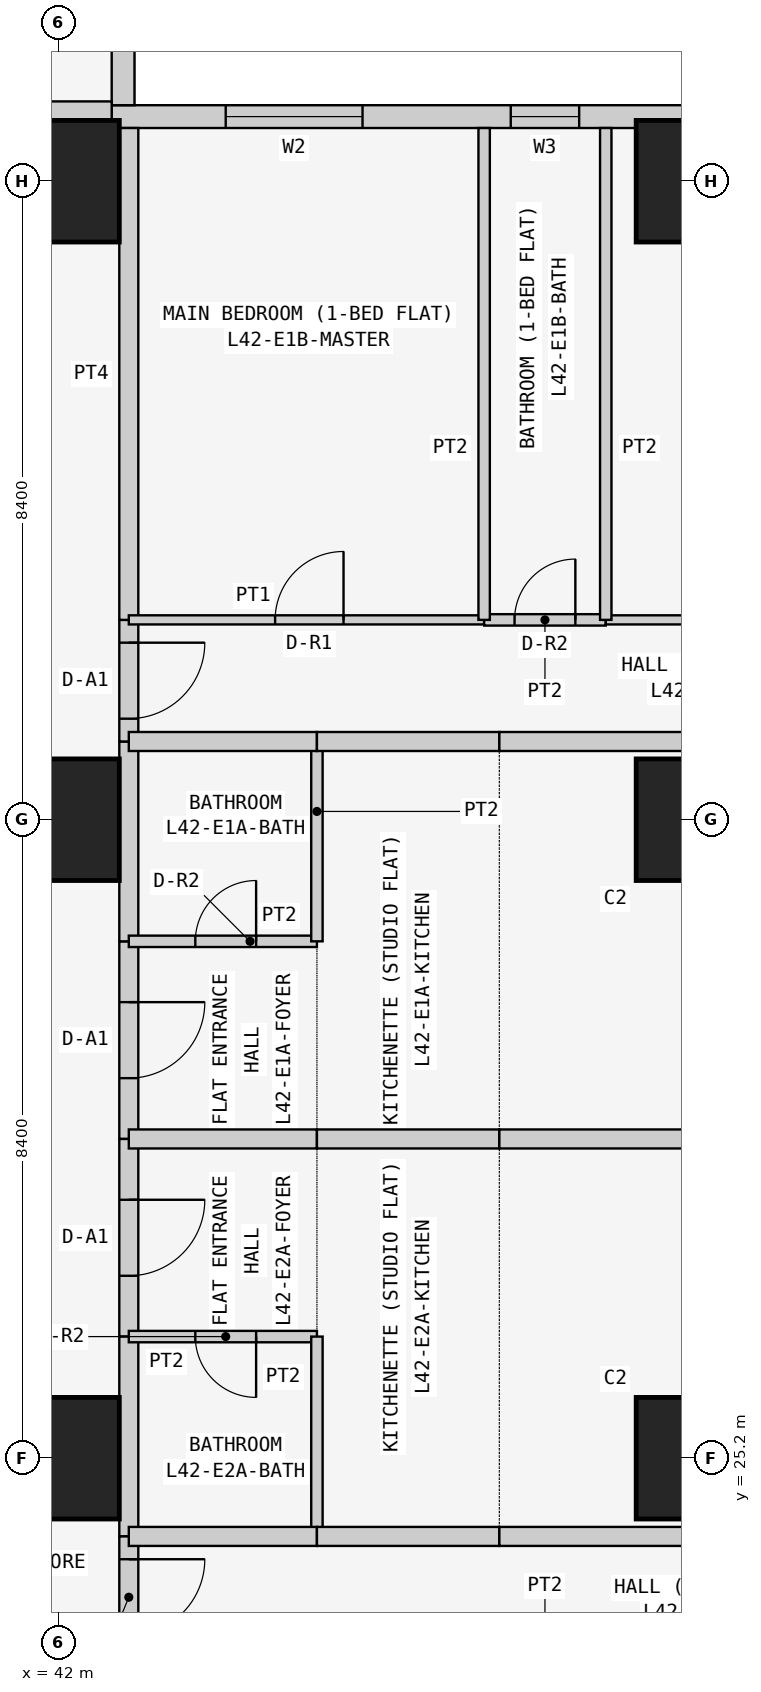
"""IFC4 building model, lengths in metres.
Left out: names, types, materials, properties, quantities, classifications, styles, units other than length and angle.
Written with IfcOpenShell. Run it as: python <this file> out.ifc"""

import sys

from ifc_helpers import new_model, si_unit, direction, frame, frame_2d, origin, origin_2d, place, context, subcontext, project, spatial, rectangle, extrude, element, fill, save


model = new_model("IFC4")
c1 = context("Model", 3, precision=1e-05, world=origin(), true_north=direction((0.0, 1.0)))
c2 = subcontext(c1, "Body", "Model", "MODEL_VIEW")
j1 = project(units=[si_unit("LENGTHUNIT", "METRE"), si_unit("PLANEANGLEUNIT", "RADIAN")], contexts=[c1])
p1 = place(None, origin())
s1 = spatial("IfcSite", under=j1, at=p1, CompositionType="ELEMENT")
p2 = place(p1, origin())
s2 = spatial("IfcBuilding", under=s1, at=p2, CompositionType="ELEMENT")
p3 = place(p2, frame((0.0, 0.0, 162.9)))
s3 = spatial("IfcBuildingStorey", under=s2, at=p3, CompositionType="ELEMENT", Elevation=162.9)
for number, where, z_axis, x_axis in (
    (1, (42.0, 25.2, 0.0), (0.0, 0.0, 1.0), (1.0, 0.0, 0.0)),
    (2, (42.0, 33.6, 0.0), (0.0, 0.0, 1.0), (1.0, 0.0, 0.0)),
    (3, (42.0, 42.0, 0.0), (0.0, 0.0, 1.0), (1.0, 0.0, 0.0)),
    (4, (50.4, 25.2, 0.0), (0.0, 0.0, 1.0), (1.0, 0.0, 0.0)),
    (5, (50.4, 33.6, 0.0), (0.0, 0.0, 1.0), (1.0, 0.0, 0.0)),
    (6, (50.4, 42.0, 0.0), (0.0, 0.0, 1.0), (1.0, 0.0, 0.0)),
):
    element("IfcColumn", number, at=place(p3, frame(where, z_axis=z_axis, x_axis=x_axis)), inside=s3, PredefinedType="COLUMN", context=c2, shape_type="SweptSolid", body=[
        extrude(rectangle(XDim=1.6, YDim=1.6, at=origin_2d()), origin(), (0.0, 0.0, 1.0), 3.6),
    ])
p4 = place(p3, frame((58.4, 42.85, 0.0), z_axis=(0.0, 0.0, 1.0), x_axis=(-1.0, 0.0, 0.0)))
e7 = element("IfcWall", 7, at=p4, inside=s3, PredefinedType="SOLIDWALL", context=c2, shape_type="SweptSolid", body=[
    extrude(rectangle(XDim=15.7, YDim=0.3, at=frame_2d((7.85, 0.0))), origin(), (0.0, 0.0, 1.0), 3.45),
])
p5 = place(p4, frame((12.4, 0.0, 0.9)))
e8 = element("IfcOpeningElement", 8, at=p5, cuts=e7, PredefinedType="OPENING", context=c2, shape_type="SweptSolid", body=[
    extrude(rectangle(XDim=1.8, YDim=1.5, at=frame_2d((0.9, 0.75))), frame((0.0, 0.16, 0.0), z_axis=(0.0, -1.0, 0.0), x_axis=(1.0, 0.0, 0.0)), (0.0, 0.0, 1.0), 0.32),
])
p6 = place(p4, frame((9.55, 0.0, 1.5)))
e9 = element("IfcOpeningElement", 9, at=p6, cuts=e7, PredefinedType="OPENING", context=c2, shape_type="SweptSolid", body=[
    extrude(rectangle(XDim=0.9, YDim=0.7, at=frame_2d((0.45, 0.35))), frame((0.0, 0.16, 0.0), z_axis=(0.0, -1.0, 0.0), x_axis=(1.0, 0.0, 0.0)), (0.0, 0.0, 1.0), 0.32),
])
p7 = place(p4, frame((5.1, 0.0, 0.9)))
e10 = element("IfcOpeningElement", 10, at=p7, cuts=e7, PredefinedType="OPENING", context=c2, shape_type="SweptSolid", body=[
    extrude(rectangle(XDim=1.8, YDim=1.5, at=frame_2d((0.9, 0.75))), frame((0.0, 0.16, 0.0), z_axis=(0.0, -1.0, 0.0), x_axis=(1.0, 0.0, 0.0)), (0.0, 0.0, 1.0), 0.32),
])
p8 = place(p4, frame((2.0, 0.0, 0.0)))
e11 = element("IfcOpeningElement", 11, at=p8, cuts=e7, PredefinedType="OPENING", context=c2, shape_type="SweptSolid", body=[
    extrude(rectangle(XDim=0.9, YDim=2.4, at=frame_2d((0.45, 1.2))), frame((0.0, 0.16, 0.0), z_axis=(0.0, -1.0, 0.0), x_axis=(1.0, 0.0, 0.0)), (0.0, 0.0, 1.0), 0.32),
])
p9 = place(p4, frame((0.7, 0.0, 0.9)))
e12 = element("IfcOpeningElement", 12, at=p9, cuts=e7, PredefinedType="OPENING", context=c2, shape_type="SweptSolid", body=[
    extrude(rectangle(XDim=1.2, YDim=1.5, at=frame_2d((0.6, 0.75))), frame((0.0, 0.16, 0.0), z_axis=(0.0, -1.0, 0.0), x_axis=(1.0, 0.0, 0.0)), (0.0, 0.0, 1.0), 0.32),
])
p10 = place(p3, frame((42.85, 43.0, 0.0), z_axis=(0.0, 0.0, 1.0), x_axis=(0.0, 1.0, 0.0)))
e13 = element("IfcWall", 13, at=p10, inside=s3, PredefinedType="SOLIDWALL", context=c2, shape_type="SweptSolid", body=[
    extrude(rectangle(XDim=7.0, YDim=0.3, at=frame_2d((3.5, 0.0))), origin(), (0.0, 0.0, 1.0), 3.45),
])
p11 = place(p10, frame((1.5, 0.0, 0.9)))
e14 = element("IfcOpeningElement", 14, at=p11, cuts=e13, PredefinedType="OPENING", context=c2, shape_type="SweptSolid", body=[
    extrude(rectangle(XDim=2.4, YDim=1.5, at=frame_2d((1.2, 0.75))), frame((0.0, 0.16, 0.0), z_axis=(0.0, -1.0, 0.0), x_axis=(1.0, 0.0, 0.0)), (0.0, 0.0, 1.0), 0.32),
])
p12 = place(p10, frame((5.05, 0.0, 0.9)))
e15 = element("IfcOpeningElement", 15, at=p12, cuts=e13, PredefinedType="OPENING", context=c2, shape_type="SweptSolid", body=[
    extrude(rectangle(XDim=1.2, YDim=1.5, at=frame_2d((0.6, 0.75))), frame((0.0, 0.16, 0.0), z_axis=(0.0, -1.0, 0.0), x_axis=(1.0, 0.0, 0.0)), (0.0, 0.0, 1.0), 0.32),
])
p13 = place(p3, frame((35.829, 42.925, 0.0), z_axis=(0.0, 0.0, 1.0), x_axis=(1.0, 0.0, 0.0)))
e16 = element("IfcWall", 16, at=p13, inside=s3, PredefinedType="PARTITIONING", context=c2, shape_type="SweptSolid", body=[
    extrude(rectangle(XDim=6.871, YDim=0.25, at=frame_2d((3.436, 0.0))), origin(), (0.0, 0.0, 1.0), 3.45),
])
p14 = place(p3, frame((42.925, 32.0, 0.0), z_axis=(0.0, 0.0, 1.0), x_axis=(0.0, -1.0, 0.0)))
e17 = element("IfcWall", 17, at=p14, inside=s3, PredefinedType="PARTITIONING", context=c2, shape_type="SweptSolid", body=[
    extrude(rectangle(XDim=2.6, YDim=0.25, at=frame_2d((1.3, 0.0))), origin(), (0.0, 0.0, 1.0), 3.45),
])
p15 = place(p14, frame((0.8, 0.0, 0.0)))
e18 = element("IfcOpeningElement", 18, at=p15, cuts=e17, PredefinedType="OPENING", context=c2, shape_type="SweptSolid", body=[
    extrude(rectangle(XDim=1.0, YDim=2.1, at=frame_2d((0.5, 1.05))), frame((0.0, 0.135, 0.0), z_axis=(0.0, -1.0, 0.0), x_axis=(1.0, 0.0, 0.0)), (0.0, 0.0, 1.0), 0.27),
])
p16 = place(p3, frame((42.925, 34.629, 0.0), z_axis=(0.0, 0.0, 1.0), x_axis=(0.0, -1.0, 0.0)))
e19 = element("IfcWall", 19, at=p16, inside=s3, PredefinedType="PARTITIONING", context=c2, shape_type="SweptSolid", body=[
    extrude(rectangle(XDim=2.629, YDim=0.25, at=frame_2d((1.314, 0.0))), origin(), (0.0, 0.0, 1.0), 3.45),
])
p17 = place(p3, frame((42.925, 36.229, 0.0), z_axis=(0.0, 0.0, 1.0), x_axis=(0.0, -1.0, 0.0)))
e20 = element("IfcWall", 20, at=p17, inside=s3, PredefinedType="PARTITIONING", context=c2, shape_type="SweptSolid", body=[
    extrude(rectangle(XDim=1.6, YDim=0.25, at=frame_2d((0.8, 0.0))), origin(), (0.0, 0.0, 1.0), 3.45),
])
p18 = place(p17, frame((0.3, 0.0, 0.0)))
e21 = element("IfcOpeningElement", 21, at=p18, cuts=e20, PredefinedType="OPENING", context=c2, shape_type="SweptSolid", body=[
    extrude(rectangle(XDim=1.0, YDim=2.1, at=frame_2d((0.5, 1.05))), frame((0.0, 0.135, 0.0), z_axis=(0.0, -1.0, 0.0), x_axis=(1.0, 0.0, 0.0)), (0.0, 0.0, 1.0), 0.27),
])
p19 = place(p3, frame((42.925, 42.7, 0.0), z_axis=(0.0, 0.0, 1.0), x_axis=(0.0, -1.0, 0.0)))
e22 = element("IfcWall", 22, at=p19, inside=s3, PredefinedType="PARTITIONING", context=c2, shape_type="SweptSolid", body=[
    extrude(rectangle(XDim=6.471, YDim=0.25, at=frame_2d((3.235, 0.0))), origin(), (0.0, 0.0, 1.0), 3.45),
])
p20 = place(p3, frame((42.925, 29.4, 0.0), z_axis=(0.0, 0.0, 1.0), x_axis=(0.0, -1.0, 0.0)))
e23 = element("IfcWall", 23, at=p20, inside=s3, PredefinedType="PARTITIONING", context=c2, shape_type="SweptSolid", body=[
    extrude(rectangle(XDim=2.6, YDim=0.25, at=frame_2d((1.3, 0.0))), origin(), (0.0, 0.0, 1.0), 3.45),
])
p21 = place(p20, frame((0.8, 0.0, 0.0)))
e24 = element("IfcOpeningElement", 24, at=p21, cuts=e23, PredefinedType="OPENING", context=c2, shape_type="SweptSolid", body=[
    extrude(rectangle(XDim=1.0, YDim=2.1, at=frame_2d((0.5, 1.05))), frame((0.0, 0.135, 0.0), z_axis=(0.0, -1.0, 0.0), x_axis=(1.0, 0.0, 0.0)), (0.0, 0.0, 1.0), 0.27),
])
p22 = place(p3, frame((42.925, 26.8, 0.0), z_axis=(0.0, 0.0, 1.0), x_axis=(0.0, -1.0, 0.0)))
e25 = element("IfcWall", 25, at=p22, inside=s3, PredefinedType="PARTITIONING", context=c2, shape_type="SweptSolid", body=[
    extrude(rectangle(XDim=2.629, YDim=0.25, at=frame_2d((1.314, 0.0))), origin(), (0.0, 0.0, 1.0), 3.45),
])
p23 = place(p3, frame((42.925, 24.171, 0.0), z_axis=(0.0, 0.0, 1.0), x_axis=(0.0, -1.0, 0.0)))
e26 = element("IfcWall", 26, at=p23, inside=s3, PredefinedType="PARTITIONING", context=c2, shape_type="SweptSolid", body=[
    extrude(rectangle(XDim=1.6, YDim=0.25, at=frame_2d((0.8, 0.0))), origin(), (0.0, 0.0, 1.0), 3.45),
])
p24 = place(p23, frame((0.3, 0.0, 0.0)))
e27 = element("IfcOpeningElement", 27, at=p24, cuts=e26, PredefinedType="OPENING", context=c2, shape_type="SweptSolid", body=[
    extrude(rectangle(XDim=1.0, YDim=2.1, at=frame_2d((0.5, 1.05))), frame((0.0, 0.135, 0.0), z_axis=(0.0, -1.0, 0.0), x_axis=(1.0, 0.0, 0.0)), (0.0, 0.0, 1.0), 0.27),
])
p25 = place(p3, frame((45.4, 32.0, 0.0), z_axis=(0.0, 0.0, 1.0), x_axis=(-1.0, 0.0, 0.0)))
e28 = element("IfcWall", 28, at=p25, inside=s3, PredefinedType="PARTITIONING", context=c2, shape_type="SweptSolid", body=[
    extrude(rectangle(XDim=2.475, YDim=0.15, at=frame_2d((1.237, 0.0))), origin(), (0.0, 0.0, 1.0), 3.45),
])
p26 = place(p25, frame((0.8, 0.0, 0.0)))
e29 = element("IfcOpeningElement", 29, at=p26, cuts=e28, PredefinedType="OPENING", context=c2, shape_type="SweptSolid", body=[
    extrude(rectangle(XDim=0.8, YDim=2.1, at=frame_2d((0.4, 1.05))), frame((0.0, 0.085, 0.0), z_axis=(0.0, -1.0, 0.0), x_axis=(1.0, 0.0, 0.0)), (0.0, 0.0, 1.0), 0.17),
])
p27 = place(p3, frame((42.925, 29.4, 0.0), z_axis=(0.0, 0.0, 1.0), x_axis=(1.0, 0.0, 0.0)))
e30 = element("IfcWall", 30, at=p27, inside=s3, PredefinedType="PARTITIONING", context=c2, shape_type="SweptSolid", body=[
    extrude(rectangle(XDim=2.475, YDim=0.25, at=frame_2d((1.237, 0.0))), origin(), (0.0, 0.0, 1.0), 3.45),
])
p28 = place(p3, frame((45.4, 32.0, 0.0), z_axis=(0.0, 0.0, 1.0), x_axis=(0.0, 1.0, 0.0)))
e31 = element("IfcWall", 31, at=p28, inside=s3, PredefinedType="PARTITIONING", context=c2, shape_type="SweptSolid", body=[
    extrude(rectangle(XDim=2.629, YDim=0.15, at=frame_2d((1.314, 0.0))), origin(), (0.0, 0.0, 1.0), 3.45),
])
p29 = place(p3, frame((45.4, 34.629, 0.0), z_axis=(0.0, 0.0, 1.0), x_axis=(-1.0, 0.0, 0.0)))
e32 = element("IfcWall", 32, at=p29, inside=s3, PredefinedType="PARTITIONING", context=c2, shape_type="SweptSolid", body=[
    extrude(rectangle(XDim=2.475, YDim=0.25, at=frame_2d((1.237, 0.0))), origin(), (0.0, 0.0, 1.0), 3.45),
])
for number, where, z_axis, x_axis in (
    (33, (47.8, 34.629, 0.0), (0.0, 0.0, 1.0), (-1.0, 0.0, 0.0)),
    (34, (45.4, 29.4, 0.0), (0.0, 0.0, 1.0), (1.0, 0.0, 0.0)),
):
    element("IfcWall", number, at=place(p3, frame(where, z_axis=z_axis, x_axis=x_axis)), inside=s3, PredefinedType="PARTITIONING", context=c2, shape_type="SweptSolid", body=[
        extrude(rectangle(XDim=2.4, YDim=0.25, at=frame_2d((1.2, 0.0))), origin(), (0.0, 0.0, 1.0), 3.45),
    ])
p30 = place(p3, frame((55.3, 34.629, 0.0), z_axis=(0.0, 0.0, 1.0), x_axis=(-1.0, 0.0, 0.0)))
e35 = element("IfcWall", 35, at=p30, inside=s3, PredefinedType="PARTITIONING", context=c2, shape_type="SweptSolid", body=[
    extrude(rectangle(XDim=7.5, YDim=0.25, at=frame_2d((3.75, 0.0))), origin(), (0.0, 0.0, 1.0), 3.45),
])
p31 = place(p3, frame((47.8, 29.4, 0.0), z_axis=(0.0, 0.0, 1.0), x_axis=(1.0, 0.0, 0.0)))
e36 = element("IfcWall", 36, at=p31, inside=s3, PredefinedType="PARTITIONING", context=c2, shape_type="SweptSolid", body=[
    extrude(rectangle(XDim=11.65, YDim=0.25, at=frame_2d((5.825, 0.0))), origin(), (0.0, 0.0, 1.0), 3.45),
])
p32 = place(p3, frame((47.6, 36.229, 0.0), z_axis=(0.0, 0.0, 1.0), x_axis=(-1.0, 0.0, 0.0)))
e37 = element("IfcWall", 37, at=p32, inside=s3, PredefinedType="PARTITIONING", context=c2, shape_type="SweptSolid", body=[
    extrude(rectangle(XDim=4.675, YDim=0.12, at=frame_2d((2.337, 0.0))), origin(), (0.0, 0.0, 1.0), 3.45),
])
p33 = place(p32, frame((1.85, 0.0, 0.0)))
e38 = element("IfcOpeningElement", 38, at=p33, cuts=e37, PredefinedType="OPENING", context=c2, shape_type="SweptSolid", body=[
    extrude(rectangle(XDim=0.9, YDim=2.1, at=frame_2d((0.45, 1.05))), frame((0.0, 0.07, 0.0), z_axis=(0.0, -1.0, 0.0), x_axis=(1.0, 0.0, 0.0)), (0.0, 0.0, 1.0), 0.14),
])
p34 = place(p3, frame((49.2, 36.229, 0.0), z_axis=(0.0, 0.0, 1.0), x_axis=(-1.0, 0.0, 0.0)))
e39 = element("IfcWall", 39, at=p34, inside=s3, PredefinedType="PARTITIONING", context=c2, shape_type="SweptSolid", body=[
    extrude(rectangle(XDim=1.6, YDim=0.15, at=frame_2d((0.8, 0.0))), origin(), (0.0, 0.0, 1.0), 3.45),
])
p35 = place(p34, frame((0.4, 0.0, 0.0)))
e40 = element("IfcOpeningElement", 40, at=p35, cuts=e39, PredefinedType="OPENING", context=c2, shape_type="SweptSolid", body=[
    extrude(rectangle(XDim=0.8, YDim=2.1, at=frame_2d((0.4, 1.05))), frame((0.0, 0.085, 0.0), z_axis=(0.0, -1.0, 0.0), x_axis=(1.0, 0.0, 0.0)), (0.0, 0.0, 1.0), 0.17),
])
p36 = place(p3, frame((53.6, 36.229, 0.0), z_axis=(0.0, 0.0, 1.0), x_axis=(-1.0, 0.0, 0.0)))
e41 = element("IfcWall", 41, at=p36, inside=s3, PredefinedType="PARTITIONING", context=c2, shape_type="SweptSolid", body=[
    extrude(rectangle(XDim=4.4, YDim=0.12, at=frame_2d((2.2, 0.0))), origin(), (0.0, 0.0, 1.0), 3.45),
])
p37 = place(p36, frame((1.55, 0.0, 0.0)))
e42 = element("IfcOpeningElement", 42, at=p37, cuts=e41, PredefinedType="OPENING", context=c2, shape_type="SweptSolid", body=[
    extrude(rectangle(XDim=0.9, YDim=2.1, at=frame_2d((0.45, 1.05))), frame((0.0, 0.07, 0.0), z_axis=(0.0, -1.0, 0.0), x_axis=(1.0, 0.0, 0.0)), (0.0, 0.0, 1.0), 0.14),
])
for number, where, z_axis, x_axis in (
    (43, (47.6, 36.229, 0.0), (0.0, 0.0, 1.0), (0.0, 1.0, 0.0)),
    (44, (49.2, 36.229, 0.0), (0.0, 0.0, 1.0), (0.0, 1.0, 0.0)),
):
    element("IfcWall", number, at=place(p3, frame(where, z_axis=z_axis, x_axis=x_axis)), inside=s3, PredefinedType="PARTITIONING", context=c2, shape_type="SweptSolid", body=[
        extrude(rectangle(XDim=6.471, YDim=0.15, at=frame_2d((3.235, 0.0))), origin(), (0.0, 0.0, 1.0), 3.45),
    ])
p38 = place(p3, frame((45.4, 26.8, 0.0), z_axis=(0.0, 0.0, 1.0), x_axis=(-1.0, 0.0, 0.0)))
e45 = element("IfcWall", 45, at=p38, inside=s3, PredefinedType="PARTITIONING", context=c2, shape_type="SweptSolid", body=[
    extrude(rectangle(XDim=2.475, YDim=0.15, at=frame_2d((1.237, 0.0))), origin(), (0.0, 0.0, 1.0), 3.45),
])
p39 = place(p38, frame((0.8, 0.0, 0.0)))
e46 = element("IfcOpeningElement", 46, at=p39, cuts=e45, PredefinedType="OPENING", context=c2, shape_type="SweptSolid", body=[
    extrude(rectangle(XDim=0.8, YDim=2.1, at=frame_2d((0.4, 1.05))), frame((0.0, 0.085, 0.0), z_axis=(0.0, -1.0, 0.0), x_axis=(1.0, 0.0, 0.0)), (0.0, 0.0, 1.0), 0.17),
])
p40 = place(p3, frame((45.4, 26.8, 0.0), z_axis=(0.0, 0.0, 1.0), x_axis=(0.0, -1.0, 0.0)))
e47 = element("IfcWall", 47, at=p40, inside=s3, PredefinedType="PARTITIONING", context=c2, shape_type="SweptSolid", body=[
    extrude(rectangle(XDim=2.629, YDim=0.15, at=frame_2d((1.314, 0.0))), origin(), (0.0, 0.0, 1.0), 3.45),
])
p41 = place(p3, frame((45.4, 24.171, 0.0), z_axis=(0.0, 0.0, 1.0), x_axis=(-1.0, 0.0, 0.0)))
e48 = element("IfcWall", 48, at=p41, inside=s3, PredefinedType="PARTITIONING", context=c2, shape_type="SweptSolid", body=[
    extrude(rectangle(XDim=2.475, YDim=0.25, at=frame_2d((1.237, 0.0))), origin(), (0.0, 0.0, 1.0), 3.45),
])
p42 = place(p3, frame((47.8, 24.171, 0.0), z_axis=(0.0, 0.0, 1.0), x_axis=(-1.0, 0.0, 0.0)))
e49 = element("IfcWall", 49, at=p42, inside=s3, PredefinedType="PARTITIONING", context=c2, shape_type="SweptSolid", body=[
    extrude(rectangle(XDim=2.4, YDim=0.25, at=frame_2d((1.2, 0.0))), origin(), (0.0, 0.0, 1.0), 3.45),
])
p43 = place(p3, frame((55.3, 24.171, 0.0), z_axis=(0.0, 0.0, 1.0), x_axis=(-1.0, 0.0, 0.0)))
e50 = element("IfcWall", 50, at=p43, inside=s3, PredefinedType="PARTITIONING", context=c2, shape_type="SweptSolid", body=[
    extrude(rectangle(XDim=7.5, YDim=0.25, at=frame_2d((3.75, 0.0))), origin(), (0.0, 0.0, 1.0), 3.45),
])
p44 = place(p5, origin())
e51 = element("IfcWindow", 51, at=p44, inside=s3, PartitioningType="SINGLE_PANEL", PredefinedType="WINDOW", context=c2, shape_type="SweptSolid", body=[
    extrude(rectangle(XDim=1.8, YDim=1.5, at=frame_2d((0.9, 0.75))), frame((0.0, 0.03, 0.0), z_axis=(0.0, -1.0, 0.0), x_axis=(1.0, 0.0, 0.0)), (0.0, 0.0, 1.0), 0.06),
])
fill(e8, e51)
p45 = place(p6, origin())
e52 = element("IfcWindow", 52, at=p45, inside=s3, PartitioningType="SINGLE_PANEL", PredefinedType="WINDOW", context=c2, shape_type="SweptSolid", body=[
    extrude(rectangle(XDim=0.9, YDim=0.7, at=frame_2d((0.45, 0.35))), frame((0.0, 0.03, 0.0), z_axis=(0.0, -1.0, 0.0), x_axis=(1.0, 0.0, 0.0)), (0.0, 0.0, 1.0), 0.06),
])
fill(e9, e52)
p46 = place(p15, origin())
e53 = element("IfcDoor", 53, at=p46, inside=s3, OperationType="SINGLE_SWING_LEFT", PredefinedType="DOOR", context=c2, shape_type="SweptSolid", body=[
    extrude(rectangle(XDim=1.0, YDim=2.1, at=frame_2d((0.5, 1.05))), frame((0.0, 0.025, 0.0), z_axis=(0.0, -1.0, 0.0), x_axis=(1.0, 0.0, 0.0)), (0.0, 0.0, 1.0), 0.05),
])
fill(e18, e53)
p47 = place(p26, frame((0.8, 0.0, 0.0), z_axis=(0.0, 0.0, 1.0), x_axis=(-1.0, 0.0, 0.0)))
e54 = element("IfcDoor", 54, at=p47, inside=s3, OperationType="SINGLE_SWING_RIGHT", PredefinedType="DOOR", context=c2, shape_type="SweptSolid", body=[
    extrude(rectangle(XDim=0.8, YDim=2.1, at=frame_2d((0.4, 1.05))), frame((0.0, 0.025, 0.0), z_axis=(0.0, -1.0, 0.0), x_axis=(1.0, 0.0, 0.0)), (0.0, 0.0, 1.0), 0.05),
])
fill(e29, e54)
p48 = place(p18, origin())
e55 = element("IfcDoor", 55, at=p48, inside=s3, OperationType="SINGLE_SWING_LEFT", PredefinedType="DOOR", context=c2, shape_type="SweptSolid", body=[
    extrude(rectangle(XDim=1.0, YDim=2.1, at=frame_2d((0.5, 1.05))), frame((0.0, 0.025, 0.0), z_axis=(0.0, -1.0, 0.0), x_axis=(1.0, 0.0, 0.0)), (0.0, 0.0, 1.0), 0.05),
])
fill(e21, e55)
p49 = place(p33, frame((0.9, 0.0, 0.0), z_axis=(0.0, 0.0, 1.0), x_axis=(-1.0, 0.0, 0.0)))
e56 = element("IfcDoor", 56, at=p49, inside=s3, OperationType="SINGLE_SWING_RIGHT", PredefinedType="DOOR", context=c2, shape_type="SweptSolid", body=[
    extrude(rectangle(XDim=0.9, YDim=2.1, at=frame_2d((0.45, 1.05))), frame((0.0, 0.025, 0.0), z_axis=(0.0, -1.0, 0.0), x_axis=(1.0, 0.0, 0.0)), (0.0, 0.0, 1.0), 0.05),
])
fill(e38, e56)
p50 = place(p35, frame((0.8, 0.0, 0.0), z_axis=(0.0, 0.0, 1.0), x_axis=(-1.0, 0.0, 0.0)))
e57 = element("IfcDoor", 57, at=p50, inside=s3, OperationType="SINGLE_SWING_RIGHT", PredefinedType="DOOR", context=c2, shape_type="SweptSolid", body=[
    extrude(rectangle(XDim=0.8, YDim=2.1, at=frame_2d((0.4, 1.05))), frame((0.0, 0.025, 0.0), z_axis=(0.0, -1.0, 0.0), x_axis=(1.0, 0.0, 0.0)), (0.0, 0.0, 1.0), 0.05),
])
fill(e40, e57)
p51 = place(p21, origin())
e58 = element("IfcDoor", 58, at=p51, inside=s3, OperationType="SINGLE_SWING_LEFT", PredefinedType="DOOR", context=c2, shape_type="SweptSolid", body=[
    extrude(rectangle(XDim=1.0, YDim=2.1, at=frame_2d((0.5, 1.05))), frame((0.0, 0.025, 0.0), z_axis=(0.0, -1.0, 0.0), x_axis=(1.0, 0.0, 0.0)), (0.0, 0.0, 1.0), 0.05),
])
fill(e24, e58)
p52 = place(p39, origin())
e59 = element("IfcDoor", 59, at=p52, inside=s3, OperationType="SINGLE_SWING_LEFT", PredefinedType="DOOR", context=c2, shape_type="SweptSolid", body=[
    extrude(rectangle(XDim=0.8, YDim=2.1, at=frame_2d((0.4, 1.05))), frame((0.0, 0.025, 0.0), z_axis=(0.0, -1.0, 0.0), x_axis=(1.0, 0.0, 0.0)), (0.0, 0.0, 1.0), 0.05),
])
fill(e46, e59)
p53 = place(p24, origin())
e60 = element("IfcDoor", 60, at=p53, inside=s3, OperationType="SINGLE_SWING_LEFT", PredefinedType="DOOR", context=c2, shape_type="SweptSolid", body=[
    extrude(rectangle(XDim=1.0, YDim=2.1, at=frame_2d((0.5, 1.05))), frame((0.0, 0.025, 0.0), z_axis=(0.0, -1.0, 0.0), x_axis=(1.0, 0.0, 0.0)), (0.0, 0.0, 1.0), 0.05),
])
fill(e27, e60)
save(model, sys.argv[1])
